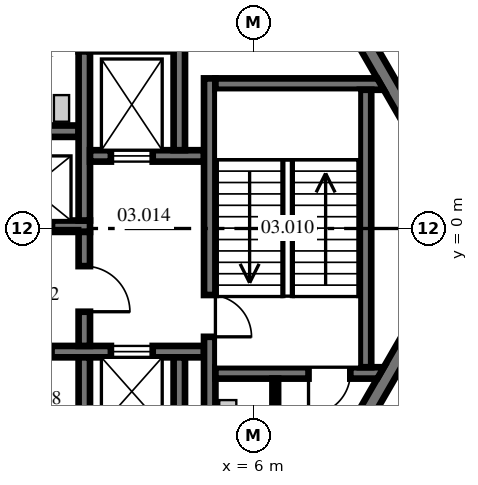
"""IFC4 building model, lengths in metres.
Left out: names, types, materials, properties, quantities, classifications, styles, units other than length and angle.
Written with IfcOpenShell. Run it as: python <this file> out.ifc"""

import sys

from ifc_helpers import new_model, si_unit, direction, frame, frame_2d, origin, place, context, subcontext, project, spatial, polyline, rectangle, outline, extrude, source, transform, mapped, element, fill, save


model = new_model("IFC4")
c1 = context("Model", 3, precision=1e-05, world=origin(), true_north=direction((0.0, 1.0)))
c2 = subcontext(c1, "Body", "Model", "MODEL_VIEW")
j1 = project(units=[si_unit("LENGTHUNIT", "METRE"), si_unit("PLANEANGLEUNIT", "RADIAN")], contexts=[c1])
p1 = place(None, origin())
s1 = spatial("IfcSite", under=j1, at=p1, CompositionType="ELEMENT")
p2 = place(p1, origin())
s2 = spatial("IfcBuilding", under=s1, at=p2, CompositionType="ELEMENT")
p3 = place(p2, frame((0.0, 0.0, 16.0)))
s3 = spatial("IfcBuildingStorey", under=s2, at=p3, CompositionType="ELEMENT", Elevation=16.0)
m1 = source(origin(), c2, "Body", "SweptSolid", [
    extrude(outline(polyline([(-0.115, -0.2), (11.885, -0.2), (11.654, 0.2), (0.115, 0.2), (-0.115, -0.2)])), origin(), (0.0, 0.0, 1.0), 4.1),
])
p4 = place(p3, frame((11.769, 0.0, 0.0), z_axis=(0.0, 0.0, 1.0), x_axis=(-0.499996592174, 0.866027371285, 0.0)))
e1 = element("IfcWall", 1, at=p4, inside=s3, PredefinedType="SHEAR", context=c2, shape_type="MappedRepresentation", body=[
    mapped(m1, transform((0.0, 0.0, 0.0), scale=1.0)),
])
p5 = place(p4, frame((5.75, 0.0, 0.0)))
e2 = element("IfcOpeningElement", 2, at=p5, cuts=e1, PredefinedType="OPENING", context=c2, shape_type="SweptSolid", body=[
    extrude(rectangle(XDim=1.2, YDim=2.1, at=frame_2d((0.6, 1.05))), frame((0.0, 0.21, 0.0), z_axis=(0.0, -1.0, 0.0), x_axis=(1.0, 0.0, 0.0)), (0.0, 0.0, 1.0), 0.42),
])
p6 = place(p3, frame((5.885, -10.192, 0.0), z_axis=(0.0, 0.0, 1.0), x_axis=(0.499996592174, 0.866027371285, 0.0)))
e3 = element("IfcWall", 3, at=p6, inside=s3, PredefinedType="SHEAR", context=c2, shape_type="MappedRepresentation", body=[
    mapped(m1, transform((0.0, 0.0, 0.0), scale=1.0)),
])
p7 = place(p6, frame((3.665, 0.0, 0.0)))
e4 = element("IfcOpeningElement", 4, at=p7, cuts=e3, PredefinedType="OPENING", context=c2, shape_type="SweptSolid", body=[
    extrude(rectangle(XDim=1.2, YDim=2.1, at=frame_2d((0.6, 1.05))), frame((0.0, 0.21, 0.0), z_axis=(0.0, -1.0, 0.0), x_axis=(1.0, 0.0, 0.0)), (0.0, 0.0, 1.0), 0.42),
])
m2 = source(origin(), c2, "Body", "SweptSolid", [
    extrude(rectangle(XDim=11.5, YDim=0.3, at=frame_2d((5.75, 0.0))), origin(), (0.0, 0.0, 1.0), 4.1),
])
p8 = place(p3, frame((-9.8, 0.06, 0.0), z_axis=(0.0, 0.0, 1.0), x_axis=(1.0, 0.0, 0.0)))
e5 = element("IfcWall", 5, at=p8, inside=s3, PredefinedType="SHEAR", context=c2, shape_type="MappedRepresentation", body=[
    mapped(m2, transform((0.0, 0.0, 0.0), scale=1.0)),
])
p9 = place(p8, frame((1.0, 0.0, 0.0)))
e6 = element("IfcOpeningElement", 6, at=p9, cuts=e5, PredefinedType="OPENING", context=c2, shape_type="SweptSolid", body=[
    extrude(rectangle(XDim=1.1, YDim=2.1, at=frame_2d((0.55, 1.05))), frame((0.0, 0.16, 0.0), z_axis=(0.0, -1.0, 0.0), x_axis=(1.0, 0.0, 0.0)), (0.0, 0.0, 1.0), 0.32),
])
p10 = place(p8, frame((3.8, 0.0, 0.0)))
e7 = element("IfcOpeningElement", 7, at=p10, cuts=e5, PredefinedType="OPENING", context=c2, shape_type="SweptSolid", body=[
    extrude(rectangle(XDim=1.1, YDim=2.1, at=frame_2d((0.55, 1.05))), frame((0.0, 0.16, 0.0), z_axis=(0.0, -1.0, 0.0), x_axis=(1.0, 0.0, 0.0)), (0.0, 0.0, 1.0), 0.32),
])
p11 = place(p8, frame((6.6, 0.0, 0.0)))
e8 = element("IfcOpeningElement", 8, at=p11, cuts=e5, PredefinedType="OPENING", context=c2, shape_type="SweptSolid", body=[
    extrude(rectangle(XDim=1.1, YDim=2.1, at=frame_2d((0.55, 1.05))), frame((0.0, 0.16, 0.0), z_axis=(0.0, -1.0, 0.0), x_axis=(1.0, 0.0, 0.0)), (0.0, 0.0, 1.0), 0.32),
])
p12 = place(p8, frame((9.4, 0.0, 0.0)))
e9 = element("IfcOpeningElement", 9, at=p12, cuts=e5, PredefinedType="OPENING", context=c2, shape_type="SweptSolid", body=[
    extrude(rectangle(XDim=1.1, YDim=2.1, at=frame_2d((0.55, 1.05))), frame((0.0, 0.16, 0.0), z_axis=(0.0, -1.0, 0.0), x_axis=(1.0, 0.0, 0.0)), (0.0, 0.0, 1.0), 0.32),
])
m3 = source(origin(), c2, "Body", "SweptSolid", [
    extrude(outline(polyline([(11.2, -0.15), (-0.349, -0.15), (-0.176, 0.15), (11.2, 0.15), (11.2, -0.15)])), origin(), (0.0, 0.0, 1.0), 4.1),
])
p13 = place(p3, frame((-9.8, 2.56, 0.0), z_axis=(0.0, 0.0, 1.0), x_axis=(1.0, 0.0, 0.0)))
e10 = element("IfcWall", 10, at=p13, inside=s3, PredefinedType="SHEAR", context=c2, shape_type="MappedRepresentation", body=[
    mapped(m3, transform((0.0, 0.0, 0.0), scale=1.0)),
])
m4 = source(origin(), c2, "Body", "SweptSolid", [
    extrude(rectangle(XDim=4.45, YDim=0.3, at=frame_2d((2.225, 0.0))), origin(), (0.0, 0.0, 1.0), 4.1),
])
p14 = place(p3, frame((1.55, 0.21, 0.0), z_axis=(0.0, 0.0, 1.0), x_axis=(0.0, 1.0, 0.0)))
e11 = element("IfcWall", 11, at=p14, inside=s3, PredefinedType="SHEAR", context=c2, shape_type="MappedRepresentation", body=[
    mapped(m4, transform((0.0, 0.0, 0.0), scale=1.0)),
])
m5 = source(origin(), c2, "Body", "SweptSolid", [
    extrude(rectangle(XDim=3.0, YDim=0.3, at=frame_2d((1.5, 0.0))), origin(), (0.0, 0.0, 1.0), 4.1),
])
p15 = place(p3, frame((1.7, 1.91, 0.0), z_axis=(0.0, 0.0, 1.0), x_axis=(1.0, 0.0, 0.0)))
e12 = element("IfcWall", 12, at=p15, inside=s3, PredefinedType="SHEAR", context=c2, shape_type="MappedRepresentation", body=[
    mapped(m5, transform((0.0, 0.0, 0.0), scale=1.0)),
])
p16 = place(p15, frame((0.55, 0.0, 0.0)))
e13 = element("IfcOpeningElement", 13, at=p16, cuts=e12, PredefinedType="OPENING", context=c2, shape_type="SweptSolid", body=[
    extrude(rectangle(XDim=1.1, YDim=2.1, at=frame_2d((0.55, 1.05))), frame((0.0, 0.16, 0.0), z_axis=(0.0, -1.0, 0.0), x_axis=(1.0, 0.0, 0.0)), (0.0, 0.0, 1.0), 0.32),
])
m6 = source(origin(), c2, "Body", "SweptSolid", [
    extrude(rectangle(XDim=2.9, YDim=0.3, at=frame_2d((1.45, 0.0))), origin(), (0.0, 0.0, 1.0), 4.1),
])
p17 = place(p3, frame((4.05, 2.06, 0.0), z_axis=(0.0, 0.0, 1.0), x_axis=(0.0, 1.0, 0.0)))
e14 = element("IfcWall", 14, at=p17, inside=s3, PredefinedType="SHEAR", context=c2, shape_type="MappedRepresentation", body=[
    mapped(m6, transform((0.0, 0.0, 0.0), scale=1.0)),
])
m7 = source(origin(), c2, "Body", "SweptSolid", [
    extrude(rectangle(XDim=12.8, YDim=0.3, at=frame_2d((6.4, 0.0))), origin(), (0.0, 0.0, 1.0), 4.1),
])
p18 = place(p3, frame((-8.1, -3.24, 0.0), z_axis=(0.0, 0.0, 1.0), x_axis=(1.0, 0.0, 0.0)))
e15 = element("IfcWall", 15, at=p18, inside=s3, PredefinedType="SHEAR", context=c2, shape_type="MappedRepresentation", body=[
    mapped(m7, transform((0.0, 0.0, 0.0), scale=1.0)),
])
p19 = place(p18, frame((2.212, 0.0, 0.0)))
e16 = element("IfcOpeningElement", 16, at=p19, cuts=e15, PredefinedType="OPENING", context=c2, shape_type="SweptSolid", body=[
    extrude(rectangle(XDim=0.9, YDim=2.1, at=frame_2d((0.45, 1.05))), frame((0.0, 0.16, 0.0), z_axis=(0.0, -1.0, 0.0), x_axis=(1.0, 0.0, 0.0)), (0.0, 0.0, 1.0), 0.32),
])
p20 = place(p18, frame((5.65, 0.0, 0.0)))
e17 = element("IfcOpeningElement", 17, at=p20, cuts=e15, PredefinedType="OPENING", context=c2, shape_type="SweptSolid", body=[
    extrude(rectangle(XDim=0.9, YDim=2.1, at=frame_2d((0.45, 1.05))), frame((0.0, 0.16, 0.0), z_axis=(0.0, -1.0, 0.0), x_axis=(1.0, 0.0, 0.0)), (0.0, 0.0, 1.0), 0.32),
])
p21 = place(p18, frame((7.887, 0.0, 0.0)))
e18 = element("IfcOpeningElement", 18, at=p21, cuts=e15, PredefinedType="OPENING", context=c2, shape_type="SweptSolid", body=[
    extrude(rectangle(XDim=0.9, YDim=2.1, at=frame_2d((0.45, 1.05))), frame((0.0, 0.16, 0.0), z_axis=(0.0, -1.0, 0.0), x_axis=(1.0, 0.0, 0.0)), (0.0, 0.0, 1.0), 0.32),
])
p22 = place(p18, frame((10.35, 0.0, 0.0)))
e19 = element("IfcOpeningElement", 19, at=p22, cuts=e15, PredefinedType="OPENING", context=c2, shape_type="SweptSolid", body=[
    extrude(rectangle(XDim=1.1, YDim=2.1, at=frame_2d((0.55, 1.05))), frame((0.0, 0.16, 0.0), z_axis=(0.0, -1.0, 0.0), x_axis=(1.0, 0.0, 0.0)), (0.0, 0.0, 1.0), 0.32),
])
m8 = source(origin(), c2, "Body", "SweptSolid", [
    extrude(rectangle(XDim=2.2, YDim=0.3, at=frame_2d((1.1, 0.0))), origin(), (0.0, 0.0, 1.0), 4.1),
])
p23 = place(p3, frame((1.55, -5.59, 0.0), z_axis=(0.0, 0.0, 1.0), x_axis=(0.0, 1.0, 0.0)))
e20 = element("IfcWall", 20, at=p23, inside=s3, PredefinedType="SHEAR", context=c2, shape_type="MappedRepresentation", body=[
    mapped(m8, transform((0.0, 0.0, 0.0), scale=1.0)),
])
m9 = source(origin(), c2, "Body", "SweptSolid", [
    extrude(rectangle(XDim=2.5, YDim=0.3, at=frame_2d((1.25, 0.0))), origin(), (0.0, 0.0, 1.0), 4.1),
])
p24 = place(p3, frame((4.05, -5.89, 0.0), z_axis=(0.0, 0.0, 1.0), x_axis=(0.0, 1.0, 0.0)))
e21 = element("IfcWall", 21, at=p24, inside=s3, PredefinedType="SHEAR", context=c2, shape_type="MappedRepresentation", body=[
    mapped(m9, transform((0.0, 0.0, 0.0), scale=1.0)),
])
p25 = place(p3, frame((1.55, -3.09, 0.0), z_axis=(0.0, 0.0, 1.0), x_axis=(0.0, 1.0, 0.0)))
e22 = element("IfcWall", 22, at=p25, inside=s3, PredefinedType="SHEAR", context=c2, shape_type="MappedRepresentation", body=[
    mapped(m5, transform((0.0, 0.0, 0.0), scale=1.0)),
])
p26 = place(p25, frame((0.9, 0.0, 0.0)))
e23 = element("IfcOpeningElement", 23, at=p26, cuts=e22, PredefinedType="OPENING", context=c2, shape_type="SweptSolid", body=[
    extrude(rectangle(XDim=1.2, YDim=2.1, at=frame_2d((0.6, 1.05))), frame((0.0, 0.16, 0.0), z_axis=(0.0, -1.0, 0.0), x_axis=(1.0, 0.0, 0.0)), (0.0, 0.0, 1.0), 0.32),
])
m10 = source(origin(), c2, "Body", "SweptSolid", [
    extrude(outline(polyline([(-0.15, -0.15), (9.99, -0.15), (9.99, 0.15), (0.15, 0.15), (-0.15, -0.15)])), origin(), (0.0, 0.0, 1.0), 4.1),
])
p27 = place(p3, frame((4.85, -6.04, 0.0), z_axis=(0.0, 0.0, 1.0), x_axis=(0.0, 1.0, 0.0)))
e24 = element("IfcWall", 24, at=p27, inside=s3, PredefinedType="SHEAR", context=c2, shape_type="MappedRepresentation", body=[
    mapped(m10, transform((0.0, 0.0, 0.0), scale=1.0)),
])
p28 = place(p27, frame((3.19, 0.0, 0.0)))
e25 = element("IfcOpeningElement", 25, at=p28, cuts=e24, PredefinedType="OPENING", context=c2, shape_type="SweptSolid", body=[
    extrude(rectangle(XDim=1.1, YDim=2.1, at=frame_2d((0.55, 1.05))), frame((0.0, 0.16, 0.0), z_axis=(0.0, -1.0, 0.0), x_axis=(1.0, 0.0, 0.0)), (0.0, 0.0, 1.0), 0.32),
])
m11 = source(origin(), c2, "Body", "SweptSolid", [
    extrude(outline(polyline([(0.0, -0.15), (0.0, 0.15), (4.26, 0.15), (4.433, -0.15), (0.0, -0.15)])), origin(), (0.0, 0.0, 1.0), 4.1),
])
p29 = place(p3, frame((5.0, 3.8, 0.0), z_axis=(0.0, 0.0, 1.0), x_axis=(1.0, 0.0, 0.0)))
e26 = element("IfcWall", 26, at=p29, inside=s3, PredefinedType="SHEAR", context=c2, shape_type="MappedRepresentation", body=[
    mapped(m11, transform((0.0, 0.0, 0.0), scale=1.0)),
])
m12 = source(origin(), c2, "Body", "SweptSolid", [
    extrude(outline(polyline([(0.0, -0.15), (0.0, 0.15), (4.433, 0.15), (4.26, -0.15), (0.0, -0.15)])), origin(), (0.0, 0.0, 1.0), 4.1),
])
p30 = place(p3, frame((5.0, -3.8, 0.0), z_axis=(0.0, 0.0, 1.0), x_axis=(1.0, 0.0, 0.0)))
e27 = element("IfcWall", 27, at=p30, inside=s3, PredefinedType="SHEAR", context=c2, shape_type="MappedRepresentation", body=[
    mapped(m12, transform((0.0, 0.0, 0.0), scale=1.0)),
])
p31 = place(p30, frame((2.45, 0.0, 0.0)))
e28 = element("IfcOpeningElement", 28, at=p31, cuts=e27, PredefinedType="OPENING", context=c2, shape_type="SweptSolid", body=[
    extrude(rectangle(XDim=1.1, YDim=2.1, at=frame_2d((0.55, 1.05))), frame((0.0, 0.16, 0.0), z_axis=(0.0, -1.0, 0.0), x_axis=(1.0, 0.0, 0.0)), (0.0, 0.0, 1.0), 0.32),
])
m13 = source(origin(), c2, "Body", "SweptSolid", [
    extrude(rectangle(XDim=7.3, YDim=0.3, at=frame_2d((3.65, 0.0))), origin(), (0.0, 0.0, 1.0), 4.1),
])
p32 = place(p3, frame((8.95, -3.65, 0.0), z_axis=(0.0, 0.0, 1.0), x_axis=(0.0, 1.0, 0.0)))
e29 = element("IfcWall", 29, at=p32, inside=s3, PredefinedType="SHEAR", context=c2, shape_type="MappedRepresentation", body=[
    mapped(m13, transform((0.0, 0.0, 0.0), scale=1.0)),
])
p33 = place(p3, frame((6.575, -8.0, 0.0), z_axis=(0.0, 0.0, 1.0), x_axis=(0.0, 1.0, 0.0)))
e30 = element("IfcWall", 30, at=p33, inside=s3, PredefinedType="PARTITIONING", context=c2, shape_type="SweptSolid", body=[
    extrude(outline(polyline([(-0.075, -0.075), (4.05, -0.075), (4.05, 0.075), (0.075, 0.075), (-0.075, -0.075)])), origin(), (0.0, 0.0, 1.0), 4.1),
])
p34 = place(p3, frame((7.251, -12.525, 0.0), z_axis=(0.0, 0.0, 1.0), x_axis=(0.499988071196, 0.866032290773, 0.0)))
e31 = element("IfcWall", 31, at=p34, inside=s3, PredefinedType="PARTITIONING", context=c2, shape_type="SweptSolid", body=[
    extrude(rectangle(XDim=9.203, YDim=0.15, at=frame_2d((4.602, 0.0))), origin(), (0.0, 0.0, 1.0), 4.1),
])
p35 = place(p34, frame((1.63, 0.0, 0.0)))
e32 = element("IfcOpeningElement", 32, at=p35, cuts=e31, PredefinedType="OPENING", context=c2, shape_type="SweptSolid", body=[
    extrude(rectangle(XDim=0.9, YDim=2.1, at=frame_2d((0.45, 1.05))), frame((0.0, 0.085, 0.0), z_axis=(0.0, -1.0, 0.0), x_axis=(1.0, 0.0, 0.0)), (0.0, 0.0, 1.0), 0.17),
])
p36 = place(p28, frame((1.1, 0.0, 0.0), z_axis=(0.0, 0.0, 1.0), x_axis=(-1.0, 0.0, 0.0)))
e33 = element("IfcDoor", 33, at=p36, inside=s3, OperationType="SINGLE_SWING_RIGHT", PredefinedType="DOOR", context=c2, shape_type="SweptSolid", body=[
    extrude(rectangle(XDim=1.1, YDim=2.1, at=frame_2d((0.55, 1.05))), frame((0.0, 0.025, 0.0), z_axis=(0.0, -1.0, 0.0), x_axis=(1.0, 0.0, 0.0)), (0.0, 0.0, 1.0), 0.05),
])
fill(e25, e33)
p37 = place(p31, frame((1.1, 0.0, 0.0), z_axis=(0.0, 0.0, 1.0), x_axis=(-1.0, 0.0, 0.0)))
e34 = element("IfcDoor", 34, at=p37, inside=s3, OperationType="SINGLE_SWING_RIGHT", PredefinedType="DOOR", context=c2, shape_type="SweptSolid", body=[
    extrude(rectangle(XDim=1.1, YDim=2.1, at=frame_2d((0.55, 1.05))), frame((0.0, 0.025, 0.0), z_axis=(0.0, -1.0, 0.0), x_axis=(1.0, 0.0, 0.0)), (0.0, 0.0, 1.0), 0.05),
])
fill(e28, e34)
p38 = place(p26, frame((1.2, 0.0, 0.0), z_axis=(0.0, 0.0, 1.0), x_axis=(-1.0, 0.0, 0.0)))
e35 = element("IfcDoor", 35, at=p38, inside=s3, OperationType="SINGLE_SWING_RIGHT", PredefinedType="DOOR", context=c2, shape_type="SweptSolid", body=[
    extrude(rectangle(XDim=1.2, YDim=2.1, at=frame_2d((0.6, 1.05))), frame((0.0, 0.025, 0.0), z_axis=(0.0, -1.0, 0.0), x_axis=(1.0, 0.0, 0.0)), (0.0, 0.0, 1.0), 0.05),
])
fill(e23, e35)
p39 = place(p16, origin())
e36 = element("IfcDoor", 36, at=p39, inside=s3, OperationType="DOUBLE_DOOR_SLIDING", PredefinedType="DOOR", context=c2, shape_type="SweptSolid", body=[
    extrude(rectangle(XDim=1.1, YDim=2.1, at=frame_2d((0.55, 1.05))), frame((0.0, 0.025, 0.0), z_axis=(0.0, -1.0, 0.0), x_axis=(1.0, 0.0, 0.0)), (0.0, 0.0, 1.0), 0.05),
])
fill(e13, e36)
p40 = place(p22, origin())
e37 = element("IfcDoor", 37, at=p40, inside=s3, OperationType="DOUBLE_DOOR_SLIDING", PredefinedType="DOOR", context=c2, shape_type="SweptSolid", body=[
    extrude(rectangle(XDim=1.1, YDim=2.1, at=frame_2d((0.55, 1.05))), frame((0.0, 0.025, 0.0), z_axis=(0.0, -1.0, 0.0), x_axis=(1.0, 0.0, 0.0)), (0.0, 0.0, 1.0), 0.05),
])
fill(e19, e37)
save(model, sys.argv[1])
